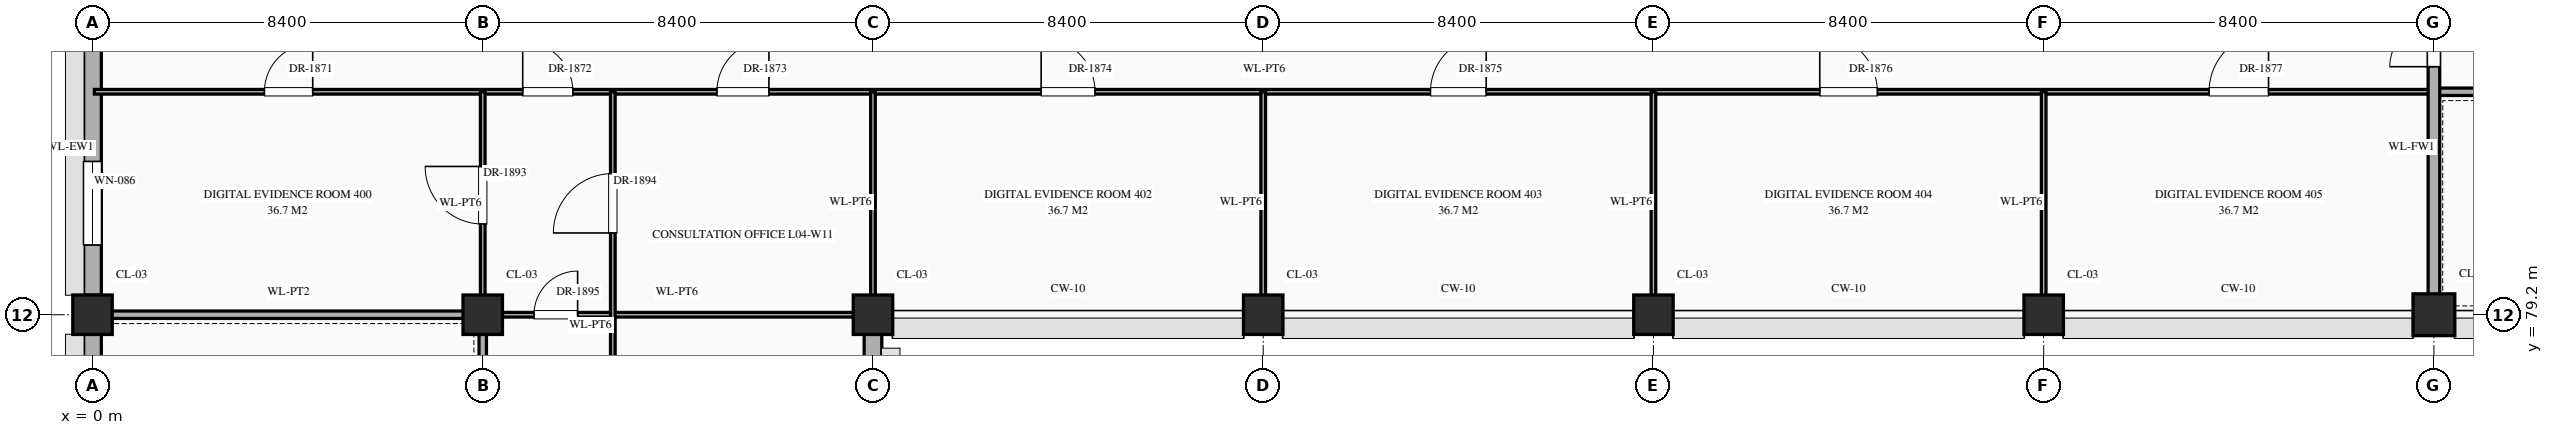
"""IFC4 building model, lengths in metres.
Left out: names, types, materials, properties, quantities, classifications, styles, units other than length and angle.
Written with IfcOpenShell. Run it as: python <this file> out.ifc"""

import sys

from ifc_helpers import new_model, si_unit, direction, frame, frame_2d, origin, origin_2d, place, context, subcontext, project, spatial, rectangle, extrude, element, fill, save


model = new_model("IFC4")
c1 = context("Model", 3, precision=1e-05, world=origin(), true_north=direction((0.0, 1.0)))
c2 = subcontext(c1, "Body", "Model", "MODEL_VIEW")
j1 = project(units=[si_unit("LENGTHUNIT", "METRE"), si_unit("PLANEANGLEUNIT", "RADIAN")], contexts=[c1])
p1 = place(None, origin())
s1 = spatial("IfcSite", under=j1, at=p1, CompositionType="ELEMENT")
p2 = place(p1, origin())
s2 = spatial("IfcBuilding", under=s1, at=p2, CompositionType="ELEMENT")
p3 = place(p2, frame((0.0, 0.0, 16.2)))
s3 = spatial("IfcBuildingStorey", under=s2, at=p3, CompositionType="ELEMENT", Elevation=16.2)
for number, where, z_axis, x_axis in (
    (1, (0.0, 79.2, 0.0), (0.0, 0.0, 1.0), (1.0, 0.0, 0.0)),
    (2, (8.4, 79.2, 0.0), (0.0, 0.0, 1.0), (1.0, 0.0, 0.0)),
    (3, (16.8, 79.2, 0.0), (0.0, 0.0, 1.0), (1.0, 0.0, 0.0)),
    (4, (25.2, 79.2, 0.0), (0.0, 0.0, 1.0), (1.0, 0.0, 0.0)),
    (5, (33.6, 79.2, 0.0), (0.0, 0.0, 1.0), (1.0, 0.0, 0.0)),
    (6, (42.0, 79.2, 0.0), (0.0, 0.0, 1.0), (1.0, 0.0, 0.0)),
):
    element("IfcColumn", number, at=place(p3, frame(where, z_axis=z_axis, x_axis=x_axis)), inside=s3, PredefinedType="COLUMN", context=c2, shape_type="SweptSolid", body=[
        extrude(rectangle(XDim=0.85, YDim=0.85, at=origin_2d()), origin(), (0.0, 0.0, 1.0), 5.4),
    ])
p4 = place(p3, frame((50.4, 79.2, 0.0), z_axis=(0.0, 0.0, 1.0), x_axis=(1.0, 0.0, 0.0)))
e7 = element("IfcColumn", 7, at=p4, inside=s3, PredefinedType="COLUMN", context=c2, shape_type="SweptSolid", body=[
    extrude(rectangle(XDim=0.9, YDim=0.9, at=origin_2d()), origin(), (0.0, 0.0, 1.0), 5.4),
])
p5 = place(p3, frame((0.0, 72.42, 0.0), z_axis=(0.0, 0.0, 1.0), x_axis=(0.0, 1.0, 0.0)))
e8 = element("IfcWall", 8, at=p5, inside=s3, PredefinedType="STANDARD", context=c2, shape_type="SweptSolid", body=[
    extrude(rectangle(XDim=6.36, YDim=0.38, at=frame_2d((3.18, 0.0))), origin(), (0.0, 0.0, 1.0), 4.55),
])
p6 = place(p5, frame((2.28, 0.0, 0.85)))
e9 = element("IfcOpeningElement", 9, at=p6, cuts=e8, PredefinedType="OPENING", context=c2, shape_type="SweptSolid", body=[
    extrude(rectangle(XDim=1.8, YDim=1.92, at=frame_2d((0.9, 0.96))), frame((0.0, 0.202, 0.0), z_axis=(0.0, -1.0, 0.0), x_axis=(1.0, 0.0, 0.0)), (0.0, 0.0, 1.0), 0.404),
])
p7 = place(p3, frame((0.0, 79.62, 0.0), z_axis=(0.0, 0.0, 1.0), x_axis=(0.0, 1.0, 0.0)))
e10 = element("IfcWall", 10, at=p7, inside=s3, PredefinedType="STANDARD", context=c2, shape_type="SweptSolid", body=[
    extrude(rectangle(XDim=6.36, YDim=0.38, at=frame_2d((3.18, 0.0))), origin(), (0.0, 0.0, 1.0), 4.55),
])
p8 = place(p7, frame((1.08, 0.0, 0.85)))
e11 = element("IfcOpeningElement", 11, at=p8, cuts=e10, PredefinedType="OPENING", context=c2, shape_type="SweptSolid", body=[
    extrude(rectangle(XDim=1.8, YDim=2.12, at=frame_2d((0.9, 1.06))), frame((0.0, 0.202, 0.0), z_axis=(0.0, -1.0, 0.0), x_axis=(1.0, 0.0, 0.0)), (0.0, 0.0, 1.0), 0.404),
])
p9 = place(p3, frame((16.8, 72.42, 0.0), z_axis=(0.0, 0.0, 1.0), x_axis=(0.0, 1.0, 0.0)))
e12 = element("IfcWall", 12, at=p9, inside=s3, PredefinedType="STANDARD", context=c2, shape_type="SweptSolid", body=[
    extrude(rectangle(XDim=6.36, YDim=0.38, at=frame_2d((3.18, 0.0))), origin(), (0.0, 0.0, 1.0), 4.55),
])
p10 = place(p9, frame((2.28, 0.0, 0.85)))
e13 = element("IfcOpeningElement", 13, at=p10, cuts=e12, PredefinedType="OPENING", context=c2, shape_type="SweptSolid", body=[
    extrude(rectangle(XDim=1.8, YDim=1.56, at=frame_2d((0.9, 0.78))), frame((0.0, 0.202, 0.0), z_axis=(0.0, -1.0, 0.0), x_axis=(1.0, 0.0, 0.0)), (0.0, 0.0, 1.0), 0.404),
])
p11 = place(p3, frame((0.04, 79.2, 0.0), z_axis=(0.0, 0.0, 1.0), x_axis=(1.0, 0.0, 0.0)))
e14 = element("IfcWall", 14, at=p11, inside=s3, PredefinedType="STANDARD", context=c2, shape_type="SweptSolid", body=[
    extrude(rectangle(XDim=8.36, YDim=0.16, at=frame_2d((4.18, 0.0))), origin(), (0.0, 0.0, 1.0), 4.35),
])
p12 = place(p3, frame((8.4, 79.2, 0.0), z_axis=(0.0, 0.0, 1.0), x_axis=(1.0, 0.0, 0.0)))
e15 = element("IfcWall", 15, at=p12, inside=s3, PredefinedType="STANDARD", context=c2, shape_type="SweptSolid", body=[
    extrude(rectangle(XDim=8.36, YDim=0.1, at=frame_2d((4.18, 0.0))), origin(), (0.0, 0.0, 1.0), 4.35),
])
p13 = place(p12, frame((1.103, 0.0, 0.0)))
e16 = element("IfcOpeningElement", 16, at=p13, cuts=e15, PredefinedType="OPENING", context=c2, shape_type="SweptSolid", body=[
    extrude(rectangle(XDim=0.94, YDim=2.3, at=frame_2d((0.47, 1.15))), frame((0.0, 0.062, 0.0), z_axis=(0.0, -1.0, 0.0), x_axis=(1.0, 0.0, 0.0)), (0.0, 0.0, 1.0), 0.124),
])
p14 = place(p3, frame((0.04, 84.0, 0.0), z_axis=(0.0, 0.0, 1.0), x_axis=(1.0, 0.0, 0.0)))
e17 = element("IfcWall", 17, at=p14, inside=s3, PredefinedType="STANDARD", context=c2, shape_type="SweptSolid", body=[
    extrude(rectangle(XDim=50.36, YDim=0.1, at=frame_2d((25.18, 0.0))), origin(), (0.0, 0.0, 1.0), 5.12),
])
p15 = place(p14, frame((3.66, 0.0, 0.0)))
e18 = element("IfcOpeningElement", 18, at=p15, cuts=e17, PredefinedType="OPENING", context=c2, shape_type="SweptSolid", body=[
    extrude(rectangle(XDim=1.04, YDim=2.2, at=frame_2d((0.52, 1.1))), frame((0.0, 0.062, 0.0), z_axis=(0.0, -1.0, 0.0), x_axis=(1.0, 0.0, 0.0)), (0.0, 0.0, 1.0), 0.124),
])
p16 = place(p14, frame((9.22, 0.0, 0.0)))
e19 = element("IfcOpeningElement", 19, at=p16, cuts=e17, PredefinedType="OPENING", context=c2, shape_type="SweptSolid", body=[
    extrude(rectangle(XDim=1.08, YDim=2.25, at=frame_2d((0.54, 1.125))), frame((0.0, 0.062, 0.0), z_axis=(0.0, -1.0, 0.0), x_axis=(1.0, 0.0, 0.0)), (0.0, 0.0, 1.0), 0.124),
])
p17 = place(p14, frame((13.4, 0.0, 0.0)))
e20 = element("IfcOpeningElement", 20, at=p17, cuts=e17, PredefinedType="OPENING", context=c2, shape_type="SweptSolid", body=[
    extrude(rectangle(XDim=1.12, YDim=2.25, at=frame_2d((0.56, 1.125))), frame((0.0, 0.062, 0.0), z_axis=(0.0, -1.0, 0.0), x_axis=(1.0, 0.0, 0.0)), (0.0, 0.0, 1.0), 0.124),
])
p18 = place(p14, frame((20.38, 0.0, 0.0)))
e21 = element("IfcOpeningElement", 21, at=p18, cuts=e17, PredefinedType="OPENING", context=c2, shape_type="SweptSolid", body=[
    extrude(rectangle(XDim=1.16, YDim=2.3, at=frame_2d((0.58, 1.15))), frame((0.0, 0.062, 0.0), z_axis=(0.0, -1.0, 0.0), x_axis=(1.0, 0.0, 0.0)), (0.0, 0.0, 1.0), 0.124),
])
p19 = place(p14, frame((28.76, 0.0, 0.0)))
e22 = element("IfcOpeningElement", 22, at=p19, cuts=e17, PredefinedType="OPENING", context=c2, shape_type="SweptSolid", body=[
    extrude(rectangle(XDim=1.2, YDim=2.35, at=frame_2d((0.6, 1.175))), frame((0.0, 0.062, 0.0), z_axis=(0.0, -1.0, 0.0), x_axis=(1.0, 0.0, 0.0)), (0.0, 0.0, 1.0), 0.124),
])
p20 = place(p14, frame((37.14, 0.0, 0.0)))
e23 = element("IfcOpeningElement", 23, at=p20, cuts=e17, PredefinedType="OPENING", context=c2, shape_type="SweptSolid", body=[
    extrude(rectangle(XDim=1.24, YDim=2.3, at=frame_2d((0.62, 1.15))), frame((0.0, 0.062, 0.0), z_axis=(0.0, -1.0, 0.0), x_axis=(1.0, 0.0, 0.0)), (0.0, 0.0, 1.0), 0.124),
])
p21 = place(p14, frame((45.52, 0.0, 0.0)))
e24 = element("IfcOpeningElement", 24, at=p21, cuts=e17, PredefinedType="OPENING", context=c2, shape_type="SweptSolid", body=[
    extrude(rectangle(XDim=1.28, YDim=2.35, at=frame_2d((0.64, 1.175))), frame((0.0, 0.062, 0.0), z_axis=(0.0, -1.0, 0.0), x_axis=(1.0, 0.0, 0.0)), (0.0, 0.0, 1.0), 0.124),
])
p22 = place(p3, frame((50.4, 84.0, 0.0), z_axis=(0.0, 0.0, 1.0), x_axis=(1.0, 0.0, 0.0)))
e25 = element("IfcWall", 25, at=p22, inside=s3, PredefinedType="STANDARD", context=c2, shape_type="SweptSolid", body=[
    extrude(rectangle(XDim=16.8, YDim=0.16, at=frame_2d((8.4, 0.0))), origin(), (0.0, 0.0, 1.0), 5.12),
])
p23 = place(p22, frame((7.45, 0.0, 0.0)))
e26 = element("IfcOpeningElement", 26, at=p23, cuts=e25, PredefinedType="OPENING", context=c2, shape_type="SweptSolid", body=[
    extrude(rectangle(XDim=1.9, YDim=2.5, at=frame_2d((0.95, 1.25))), frame((0.0, 0.092, 0.0), z_axis=(0.0, -1.0, 0.0), x_axis=(1.0, 0.0, 0.0)), (0.0, 0.0, 1.0), 0.184),
])
p24 = place(p3, frame((8.4, 64.8, 0.0), z_axis=(0.0, 0.0, 1.0), x_axis=(0.0, 1.0, 0.0)))
e27 = element("IfcWall", 27, at=p24, inside=s3, PredefinedType="STANDARD", context=c2, shape_type="SweptSolid", body=[
    extrude(rectangle(XDim=14.4, YDim=0.16, at=frame_2d((7.2, 0.0))), origin(), (0.0, 0.0, 1.0), 5.2),
])
p25 = place(p24, frame((6.252, 0.0, 0.0)))
e28 = element("IfcOpeningElement", 28, at=p25, cuts=e27, PredefinedType="OPENING", context=c2, shape_type="SweptSolid", body=[
    extrude(rectangle(XDim=1.55, YDim=2.35, at=frame_2d((0.775, 1.175))), frame((0.0, 0.092, 0.0), z_axis=(0.0, -1.0, 0.0), x_axis=(1.0, 0.0, 0.0)), (0.0, 0.0, 1.0), 0.184),
])
p26 = place(p3, frame((8.4, 79.2, 0.0), z_axis=(0.0, 0.0, 1.0), x_axis=(0.0, 1.0, 0.0)))
e29 = element("IfcWall", 29, at=p26, inside=s3, PredefinedType="STANDARD", context=c2, shape_type="SweptSolid", body=[
    extrude(rectangle(XDim=4.8, YDim=0.1, at=frame_2d((2.4, 0.0))), origin(), (0.0, 0.0, 1.0), 4.45),
])
p27 = place(p26, frame((1.952, 0.0, 0.0)))
e30 = element("IfcOpeningElement", 30, at=p27, cuts=e29, PredefinedType="OPENING", context=c2, shape_type="SweptSolid", body=[
    extrude(rectangle(XDim=1.24, YDim=2.3, at=frame_2d((0.62, 1.15))), frame((0.0, 0.062, 0.0), z_axis=(0.0, -1.0, 0.0), x_axis=(1.0, 0.0, 0.0)), (0.0, 0.0, 1.0), 0.124),
])
p28 = place(p3, frame((11.2, 64.8, 0.0), z_axis=(0.0, 0.0, 1.0), x_axis=(0.0, 1.0, 0.0)))
e31 = element("IfcWall", 31, at=p28, inside=s3, PredefinedType="STANDARD", context=c2, shape_type="SweptSolid", body=[
    extrude(rectangle(XDim=19.2, YDim=0.1, at=frame_2d((9.6, 0.0))), origin(), (0.0, 0.0, 1.0), 5.2),
])
p29 = place(p28, frame((16.16, 0.0, 0.0)))
e32 = element("IfcOpeningElement", 32, at=p29, cuts=e31, PredefinedType="OPENING", context=c2, shape_type="SweptSolid", body=[
    extrude(rectangle(XDim=1.28, YDim=2.35, at=frame_2d((0.64, 1.175))), frame((0.0, 0.062, 0.0), z_axis=(0.0, -1.0, 0.0), x_axis=(1.0, 0.0, 0.0)), (0.0, 0.0, 1.0), 0.124),
])
p30 = place(p28, frame((0.72, 0.0, 0.0)))
e33 = element("IfcOpeningElement", 33, at=p30, cuts=e31, PredefinedType="OPENING", context=c2, shape_type="SweptSolid", body=[
    extrude(rectangle(XDim=0.96, YDim=2.2, at=frame_2d((0.48, 1.1))), frame((0.0, 0.062, 0.0), z_axis=(0.0, -1.0, 0.0), x_axis=(1.0, 0.0, 0.0)), (0.0, 0.0, 1.0), 0.124),
])
p31 = place(p28, frame((4.3, 0.0, 0.0)))
e34 = element("IfcOpeningElement", 34, at=p31, cuts=e31, PredefinedType="OPENING", context=c2, shape_type="SweptSolid", body=[
    extrude(rectangle(XDim=1.0, YDim=2.25, at=frame_2d((0.5, 1.125))), frame((0.0, 0.062, 0.0), z_axis=(0.0, -1.0, 0.0), x_axis=(1.0, 0.0, 0.0)), (0.0, 0.0, 1.0), 0.124),
])
p32 = place(p28, frame((10.28, 0.0, 0.0)))
e35 = element("IfcOpeningElement", 35, at=p32, cuts=e31, PredefinedType="OPENING", context=c2, shape_type="SweptSolid", body=[
    extrude(rectangle(XDim=1.04, YDim=2.2, at=frame_2d((0.52, 1.1))), frame((0.0, 0.062, 0.0), z_axis=(0.0, -1.0, 0.0), x_axis=(1.0, 0.0, 0.0)), (0.0, 0.0, 1.0), 0.124),
])
for number, where, z_axis, x_axis in (
    (36, (16.8, 79.24, 0.0), (0.0, 0.0, 1.0), (0.0, 1.0, 0.0)),
    (37, (25.2, 79.24, 0.0), (0.0, 0.0, 1.0), (0.0, 1.0, 0.0)),
):
    element("IfcWall", number, at=place(p3, frame(where, z_axis=z_axis, x_axis=x_axis)), inside=s3, PredefinedType="STANDARD", context=c2, shape_type="SweptSolid", body=[
        extrude(rectangle(XDim=4.76, YDim=0.1, at=frame_2d((2.38, 0.0))), origin(), (0.0, 0.0, 1.0), 4.3),
    ])
for number, where, z_axis, x_axis in (
    (38, (33.6, 79.24, 0.0), (0.0, 0.0, 1.0), (0.0, 1.0, 0.0)),
    (39, (42.0, 79.24, 0.0), (0.0, 0.0, 1.0), (0.0, 1.0, 0.0)),
):
    element("IfcWall", number, at=place(p3, frame(where, z_axis=z_axis, x_axis=x_axis)), inside=s3, PredefinedType="STANDARD", context=c2, shape_type="SweptSolid", body=[
        extrude(rectangle(XDim=4.76, YDim=0.1, at=frame_2d((2.38, 0.0))), origin(), (0.0, 0.0, 1.0), 4.37),
    ])
p33 = place(p3, frame((50.4, 79.24, 0.0), z_axis=(0.0, 0.0, 1.0), x_axis=(0.0, 1.0, 0.0)))
e40 = element("IfcWall", 40, at=p33, inside=s3, PredefinedType="STANDARD", context=c2, shape_type="SweptSolid", body=[
    extrude(rectangle(XDim=7.16, YDim=0.25, at=frame_2d((3.58, 0.0))), origin(), (0.0, 0.0, 1.0), 4.37),
])
p34 = place(p33, frame((5.3, 0.0, 0.0)))
e41 = element("IfcOpeningElement", 41, at=p34, cuts=e40, PredefinedType="OPENING", context=c2, shape_type="SweptSolid", body=[
    extrude(rectangle(XDim=0.95, YDim=2.15, at=frame_2d((0.475, 1.075))), frame((0.0, 0.137, 0.0), z_axis=(0.0, -1.0, 0.0), x_axis=(1.0, 0.0, 0.0)), (0.0, 0.0, 1.0), 0.274),
])
p35 = place(p8, origin())
e42 = element("IfcWindow", 42, at=p35, inside=s3, PartitioningType="SINGLE_PANEL", PredefinedType="WINDOW", context=c2, shape_type="SweptSolid", body=[
    extrude(rectangle(XDim=1.8, YDim=2.12, at=frame_2d((0.9, 1.06))), frame((0.0, 0.03, 0.0), z_axis=(0.0, -1.0, 0.0), x_axis=(1.0, 0.0, 0.0)), (0.0, 0.0, 1.0), 0.06),
])
fill(e11, e42)
p36 = place(p34, origin())
e43 = element("IfcDoor", 43, at=p36, inside=s3, OperationType="SINGLE_SWING_LEFT", PredefinedType="DOOR", context=c2, shape_type="SweptSolid", body=[
    extrude(rectangle(XDim=0.95, YDim=2.15, at=frame_2d((0.475, 1.075))), frame((0.0, 0.025, 0.0), z_axis=(0.0, -1.0, 0.0), x_axis=(1.0, 0.0, 0.0)), (0.0, 0.0, 1.0), 0.05),
])
fill(e41, e43)
p37 = place(p15, origin())
e44 = element("IfcDoor", 44, at=p37, inside=s3, OperationType="SINGLE_SWING_RIGHT", PredefinedType="DOOR", context=c2, shape_type="SweptSolid", body=[
    extrude(rectangle(XDim=1.04, YDim=2.2, at=frame_2d((0.52, 1.1))), frame((0.0, 0.025, 0.0), z_axis=(0.0, -1.0, 0.0), x_axis=(1.0, 0.0, 0.0)), (0.0, 0.0, 1.0), 0.05),
])
fill(e18, e44)
p38 = place(p16, origin())
e45 = element("IfcDoor", 45, at=p38, inside=s3, OperationType="SINGLE_SWING_LEFT", PredefinedType="DOOR", context=c2, shape_type="SweptSolid", body=[
    extrude(rectangle(XDim=1.08, YDim=2.25, at=frame_2d((0.54, 1.125))), frame((0.0, 0.025, 0.0), z_axis=(0.0, -1.0, 0.0), x_axis=(1.0, 0.0, 0.0)), (0.0, 0.0, 1.0), 0.05),
])
fill(e19, e45)
p39 = place(p17, origin())
e46 = element("IfcDoor", 46, at=p39, inside=s3, OperationType="SINGLE_SWING_RIGHT", PredefinedType="DOOR", context=c2, shape_type="SweptSolid", body=[
    extrude(rectangle(XDim=1.12, YDim=2.25, at=frame_2d((0.56, 1.125))), frame((0.0, 0.025, 0.0), z_axis=(0.0, -1.0, 0.0), x_axis=(1.0, 0.0, 0.0)), (0.0, 0.0, 1.0), 0.05),
])
fill(e20, e46)
p40 = place(p18, origin())
e47 = element("IfcDoor", 47, at=p40, inside=s3, OperationType="SINGLE_SWING_LEFT", PredefinedType="DOOR", context=c2, shape_type="SweptSolid", body=[
    extrude(rectangle(XDim=1.16, YDim=2.3, at=frame_2d((0.58, 1.15))), frame((0.0, 0.025, 0.0), z_axis=(0.0, -1.0, 0.0), x_axis=(1.0, 0.0, 0.0)), (0.0, 0.0, 1.0), 0.05),
])
fill(e21, e47)
p41 = place(p19, origin())
e48 = element("IfcDoor", 48, at=p41, inside=s3, OperationType="SINGLE_SWING_RIGHT", PredefinedType="DOOR", context=c2, shape_type="SweptSolid", body=[
    extrude(rectangle(XDim=1.2, YDim=2.35, at=frame_2d((0.6, 1.175))), frame((0.0, 0.025, 0.0), z_axis=(0.0, -1.0, 0.0), x_axis=(1.0, 0.0, 0.0)), (0.0, 0.0, 1.0), 0.05),
])
fill(e22, e48)
p42 = place(p20, origin())
e49 = element("IfcDoor", 49, at=p42, inside=s3, OperationType="SINGLE_SWING_LEFT", PredefinedType="DOOR", context=c2, shape_type="SweptSolid", body=[
    extrude(rectangle(XDim=1.24, YDim=2.3, at=frame_2d((0.62, 1.15))), frame((0.0, 0.025, 0.0), z_axis=(0.0, -1.0, 0.0), x_axis=(1.0, 0.0, 0.0)), (0.0, 0.0, 1.0), 0.05),
])
fill(e23, e49)
p43 = place(p21, origin())
e50 = element("IfcDoor", 50, at=p43, inside=s3, OperationType="SINGLE_SWING_RIGHT", PredefinedType="DOOR", context=c2, shape_type="SweptSolid", body=[
    extrude(rectangle(XDim=1.28, YDim=2.35, at=frame_2d((0.64, 1.175))), frame((0.0, 0.025, 0.0), z_axis=(0.0, -1.0, 0.0), x_axis=(1.0, 0.0, 0.0)), (0.0, 0.0, 1.0), 0.05),
])
fill(e24, e50)
p44 = place(p27, origin())
e51 = element("IfcDoor", 51, at=p44, inside=s3, OperationType="SINGLE_SWING_RIGHT", PredefinedType="DOOR", context=c2, shape_type="SweptSolid", body=[
    extrude(rectangle(XDim=1.24, YDim=2.3, at=frame_2d((0.62, 1.15))), frame((0.0, 0.025, 0.0), z_axis=(0.0, -1.0, 0.0), x_axis=(1.0, 0.0, 0.0)), (0.0, 0.0, 1.0), 0.05),
])
fill(e30, e51)
p45 = place(p29, origin())
e52 = element("IfcDoor", 52, at=p45, inside=s3, OperationType="SINGLE_SWING_LEFT", PredefinedType="DOOR", context=c2, shape_type="SweptSolid", body=[
    extrude(rectangle(XDim=1.28, YDim=2.35, at=frame_2d((0.64, 1.175))), frame((0.0, 0.025, 0.0), z_axis=(0.0, -1.0, 0.0), x_axis=(1.0, 0.0, 0.0)), (0.0, 0.0, 1.0), 0.05),
])
fill(e32, e52)
p46 = place(p13, origin())
e53 = element("IfcDoor", 53, at=p46, inside=s3, OperationType="SINGLE_SWING_RIGHT", PredefinedType="DOOR", context=c2, shape_type="SweptSolid", body=[
    extrude(rectangle(XDim=0.94, YDim=2.3, at=frame_2d((0.47, 1.15))), frame((0.0, 0.025, 0.0), z_axis=(0.0, -1.0, 0.0), x_axis=(1.0, 0.0, 0.0)), (0.0, 0.0, 1.0), 0.05),
])
fill(e16, e53)
save(model, sys.argv[1])
